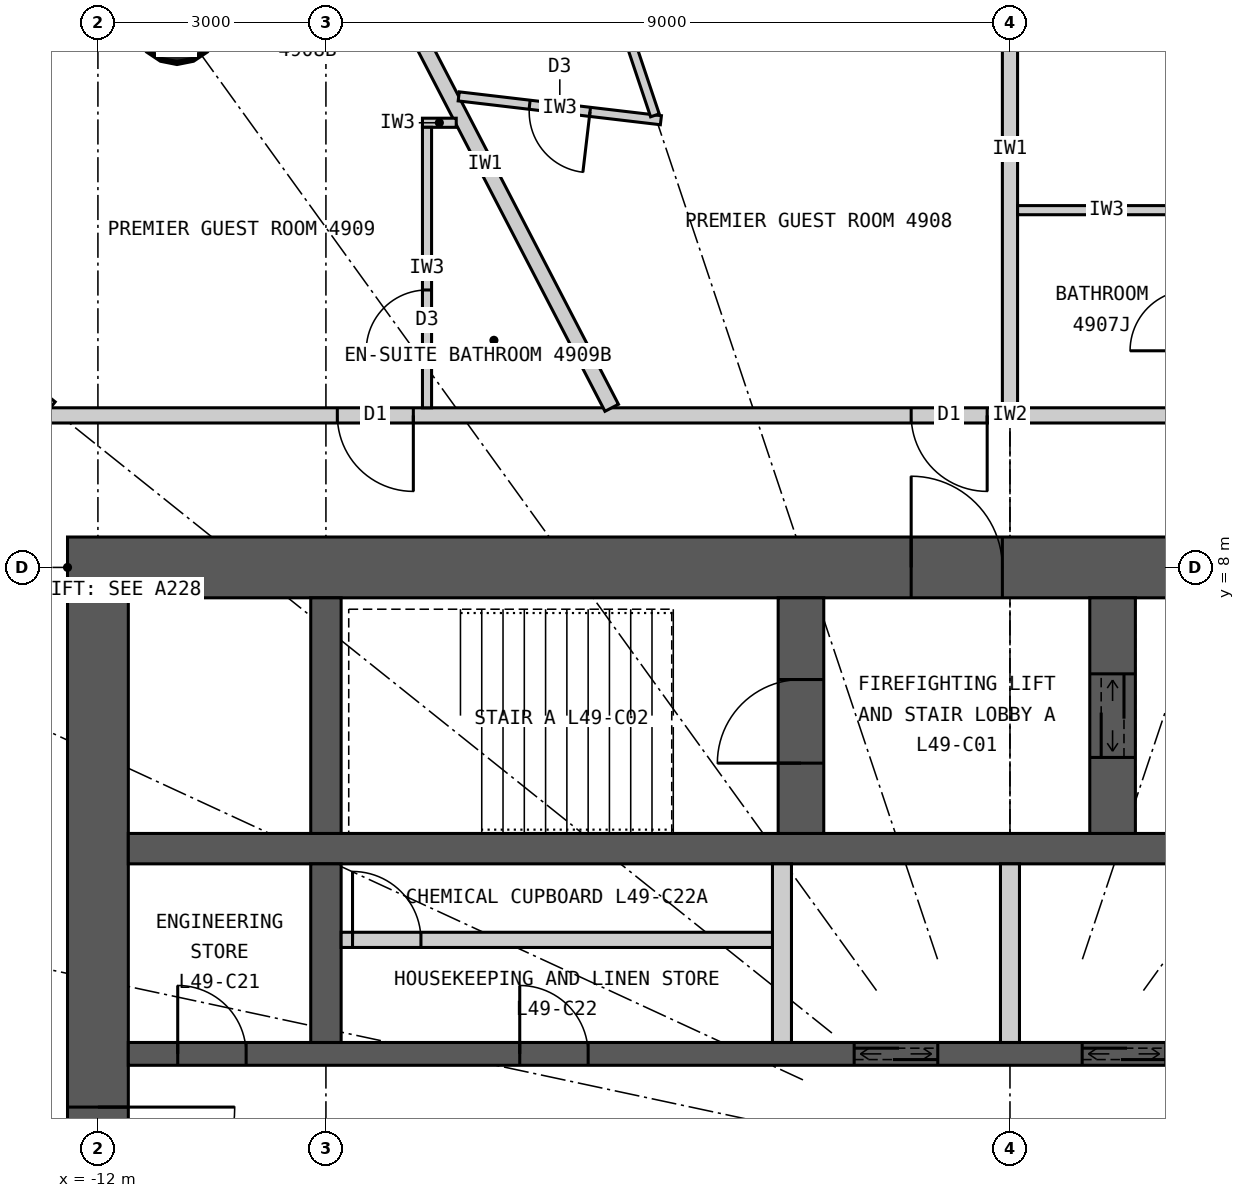
"""IFC4 building model, lengths in metres.
Left out: names, types, materials, properties, quantities, classifications, styles, units other than length and angle.
Written with IfcOpenShell. Run it as: python <this file> out.ifc"""

import sys

from ifc_helpers import new_model, si_unit, direction, frame, frame_2d, origin, origin_2d, place, context, subcontext, project, spatial, rectangle, circle, extrude, clip, halfspace, element, fill, save


model = new_model("IFC4")
c1 = context("Model", 3, precision=1e-05, world=origin(), true_north=direction((0.0, 1.0)))
c2 = subcontext(c1, "Body", "Model", "MODEL_VIEW")
j1 = project(units=[si_unit("LENGTHUNIT", "METRE"), si_unit("PLANEANGLEUNIT", "RADIAN")], contexts=[c1])
p1 = place(None, origin())
s1 = spatial("IfcSite", under=j1, at=p1, CompositionType="ELEMENT")
p2 = place(p1, origin())
s2 = spatial("IfcBuilding", under=s1, at=p2, CompositionType="ELEMENT")
p3 = place(p2, frame((0.0, 0.0, 183.0)))
s3 = spatial("IfcBuildingStorey", under=s2, at=p3, CompositionType="ELEMENT", Elevation=183.0)
p4 = place(p3, frame((-10.96, 15.186, 0.0), z_axis=(0.0, 0.0, 1.0), x_axis=(1.0, 0.0, 0.0)))
e1 = element("IfcColumn", 1, at=p4, inside=s3, PredefinedType="COLUMN", context=c2, shape_type="Clipping", body=[
    clip(extrude(circle(Radius=0.55, at=origin_2d()), origin(), (0.0, 0.0, 1.0), 3.3), halfspace(frame((0.0, 0.0, 2.25), z_axis=(0.0, 0.0, 1.0), x_axis=(1.0, 0.0, 0.0)), False)),
])
p5 = place(p3, frame((-12.4, 8.0, 0.0), z_axis=(0.0, 0.0, 1.0), x_axis=(1.0, 0.0, 0.0)))
e2 = element("IfcWall", 2, at=p5, inside=s3, PredefinedType="SHEAR", context=c2, shape_type="SweptSolid", body=[
    extrude(rectangle(XDim=24.8, YDim=0.8, at=frame_2d((12.4, 0.0))), origin(), (0.0, 0.0, 1.0), 3.3),
])
p6 = place(p5, frame((11.1, 0.0, 0.0)))
e3 = element("IfcOpeningElement", 3, at=p6, cuts=e2, PredefinedType="OPENING", context=c2, shape_type="SweptSolid", body=[
    extrude(rectangle(XDim=1.2, YDim=2.2, at=frame_2d((0.6, 1.1))), frame((0.0, 0.41, 0.0), z_axis=(0.0, -1.0, 0.0), x_axis=(1.0, 0.0, 0.0)), (0.0, 0.0, 1.0), 0.82),
])
p7 = place(p5, frame((18.7, 0.0, 0.0)))
e4 = element("IfcOpeningElement", 4, at=p7, cuts=e2, PredefinedType="OPENING", context=c2, shape_type="SweptSolid", body=[
    extrude(rectangle(XDim=0.9, YDim=2.2, at=frame_2d((0.45, 1.1))), frame((0.0, 0.41, 0.0), z_axis=(0.0, -1.0, 0.0), x_axis=(1.0, 0.0, 0.0)), (0.0, 0.0, 1.0), 0.82),
])
p8 = place(p3, frame((-12.0, 7.6, 0.0), z_axis=(0.0, 0.0, 1.0), x_axis=(0.0, -1.0, 0.0)))
e5 = element("IfcWall", 5, at=p8, inside=s3, PredefinedType="SHEAR", context=c2, shape_type="SweptSolid", body=[
    extrude(rectangle(XDim=15.2, YDim=0.8, at=frame_2d((7.6, 0.0))), origin(), (0.0, 0.0, 1.0), 3.3),
])
p9 = place(p8, frame((6.7, 0.0, 0.0)))
e6 = element("IfcOpeningElement", 6, at=p9, cuts=e5, PredefinedType="OPENING", context=c2, shape_type="SweptSolid", body=[
    extrude(rectangle(XDim=1.8, YDim=2.2, at=frame_2d((0.9, 1.1))), frame((0.0, 0.41, 0.0), z_axis=(0.0, -1.0, 0.0), x_axis=(1.0, 0.0, 0.0)), (0.0, 0.0, 1.0), 0.82),
])
p10 = place(p3, frame((-11.6, 4.3, 0.0), z_axis=(0.0, 0.0, 1.0), x_axis=(1.0, 0.0, 0.0)))
e7 = element("IfcWall", 7, at=p10, inside=s3, PredefinedType="SHEAR", context=c2, shape_type="SweptSolid", body=[
    extrude(rectangle(XDim=23.2, YDim=0.4, at=frame_2d((11.6, 0.0))), origin(), (0.0, 0.0, 1.0), 3.3),
])
p11 = place(p3, frame((-11.6, 1.6, 0.0), z_axis=(0.0, 0.0, 1.0), x_axis=(1.0, 0.0, 0.0)))
e8 = element("IfcWall", 8, at=p11, inside=s3, PredefinedType="SHEAR", context=c2, shape_type="SweptSolid", body=[
    extrude(rectangle(XDim=23.2, YDim=0.3, at=frame_2d((11.6, 0.0))), origin(), (0.0, 0.0, 1.0), 3.3),
])
p12 = place(p11, frame((9.55, 0.0, 0.0)))
e9 = element("IfcOpeningElement", 9, at=p12, cuts=e8, PredefinedType="OPENING", context=c2, shape_type="SweptSolid", body=[
    extrude(rectangle(XDim=1.1, YDim=2.2, at=frame_2d((0.55, 1.1))), frame((0.0, 0.16, 0.0), z_axis=(0.0, -1.0, 0.0), x_axis=(1.0, 0.0, 0.0)), (0.0, 0.0, 1.0), 0.32),
])
p13 = place(p11, frame((12.55, 0.0, 0.0)))
e10 = element("IfcOpeningElement", 10, at=p13, cuts=e8, PredefinedType="OPENING", context=c2, shape_type="SweptSolid", body=[
    extrude(rectangle(XDim=1.1, YDim=2.2, at=frame_2d((0.55, 1.1))), frame((0.0, 0.16, 0.0), z_axis=(0.0, -1.0, 0.0), x_axis=(1.0, 0.0, 0.0)), (0.0, 0.0, 1.0), 0.32),
])
p14 = place(p11, frame((0.65, 0.0, 0.0)))
e11 = element("IfcOpeningElement", 11, at=p14, cuts=e8, PredefinedType="OPENING", context=c2, shape_type="SweptSolid", body=[
    extrude(rectangle(XDim=0.9, YDim=2.2, at=frame_2d((0.45, 1.1))), frame((0.0, 0.16, 0.0), z_axis=(0.0, -1.0, 0.0), x_axis=(1.0, 0.0, 0.0)), (0.0, 0.0, 1.0), 0.32),
])
p15 = place(p11, frame((5.15, 0.0, 0.0)))
e12 = element("IfcOpeningElement", 12, at=p15, cuts=e8, PredefinedType="OPENING", context=c2, shape_type="SweptSolid", body=[
    extrude(rectangle(XDim=0.9, YDim=2.2, at=frame_2d((0.45, 1.1))), frame((0.0, 0.16, 0.0), z_axis=(0.0, -1.0, 0.0), x_axis=(1.0, 0.0, 0.0)), (0.0, 0.0, 1.0), 0.32),
])
p16 = place(p11, frame((21.65, 0.0, 0.0)))
e13 = element("IfcOpeningElement", 13, at=p16, cuts=e8, PredefinedType="OPENING", context=c2, shape_type="SweptSolid", body=[
    extrude(rectangle(XDim=0.9, YDim=2.2, at=frame_2d((0.45, 1.1))), frame((0.0, 0.16, 0.0), z_axis=(0.0, -1.0, 0.0), x_axis=(1.0, 0.0, 0.0)), (0.0, 0.0, 1.0), 0.32),
])
p17 = place(p3, frame((-9.0, 4.5, 0.0), z_axis=(0.0, 0.0, 1.0), x_axis=(0.0, 1.0, 0.0)))
e14 = element("IfcWall", 14, at=p17, inside=s3, PredefinedType="SHEAR", context=c2, shape_type="SweptSolid", body=[
    extrude(rectangle(XDim=3.1, YDim=0.4, at=frame_2d((1.55, 0.0))), origin(), (0.0, 0.0, 1.0), 3.3),
])
p18 = place(p3, frame((-9.0, 1.75, 0.0), z_axis=(0.0, 0.0, 1.0), x_axis=(0.0, 1.0, 0.0)))
e15 = element("IfcWall", 15, at=p18, inside=s3, PredefinedType="SHEAR", context=c2, shape_type="SweptSolid", body=[
    extrude(rectangle(XDim=2.35, YDim=0.4, at=frame_2d((1.175, 0.0))), origin(), (0.0, 0.0, 1.0), 3.3),
])
p19 = place(p3, frame((-2.75, 4.5, 0.0), z_axis=(0.0, 0.0, 1.0), x_axis=(0.0, 1.0, 0.0)))
e16 = element("IfcWall", 16, at=p19, inside=s3, PredefinedType="SHEAR", context=c2, shape_type="SweptSolid", body=[
    extrude(rectangle(XDim=3.1, YDim=0.6, at=frame_2d((1.55, 0.0))), origin(), (0.0, 0.0, 1.0), 3.3),
])
p20 = place(p19, frame((0.925, 0.0, 0.0)))
e17 = element("IfcOpeningElement", 17, at=p20, cuts=e16, PredefinedType="OPENING", context=c2, shape_type="SweptSolid", body=[
    extrude(rectangle(XDim=1.1, YDim=2.2, at=frame_2d((0.55, 1.1))), frame((0.0, 0.31, 0.0), z_axis=(0.0, -1.0, 0.0), x_axis=(1.0, 0.0, 0.0)), (0.0, 0.0, 1.0), 0.62),
])
p21 = place(p3, frame((1.35, 4.5, 0.0), z_axis=(0.0, 0.0, 1.0), x_axis=(0.0, 1.0, 0.0)))
e18 = element("IfcWall", 18, at=p21, inside=s3, PredefinedType="SHEAR", context=c2, shape_type="SweptSolid", body=[
    extrude(rectangle(XDim=3.1, YDim=0.6, at=frame_2d((1.55, 0.0))), origin(), (0.0, 0.0, 1.0), 3.3),
])
p22 = place(p21, frame((1.0, 0.0, 0.0)))
e19 = element("IfcOpeningElement", 19, at=p22, cuts=e18, PredefinedType="OPENING", context=c2, shape_type="SweptSolid", body=[
    extrude(rectangle(XDim=1.1, YDim=2.2, at=frame_2d((0.55, 1.1))), frame((0.0, 0.31, 0.0), z_axis=(0.0, -1.0, 0.0), x_axis=(1.0, 0.0, 0.0)), (0.0, 0.0, 1.0), 0.62),
])
for number, where, z_axis, x_axis in (
    (20, (-3.0, 1.75, 0.0), (0.0, 0.0, 1.0), (0.0, 1.0, 0.0)),
    (21, (0.0, 1.75, 0.0), (0.0, 0.0, 1.0), (0.0, 1.0, 0.0)),
):
    element("IfcWall", number, at=place(p3, frame(where, z_axis=z_axis, x_axis=x_axis)), inside=s3, PredefinedType="PARTITIONING", context=c2, shape_type="SweptSolid", body=[
        extrude(rectangle(XDim=2.35, YDim=0.25, at=frame_2d((1.175, 0.0))), origin(), (0.0, 0.0, 1.0), 3.3),
    ])
p23 = place(p3, frame((-11.346, 15.722, 0.0), z_axis=(0.0, 0.0, 1.0), x_axis=(-0.857695199231, -0.514158482587, 0.0)))
e22 = element("IfcWall", 22, at=p23, inside=s3, PredefinedType="ELEMENTEDWALL", context=c2, shape_type="SweptSolid", body=[
    extrude(rectangle(XDim=5.536, YDim=0.15, at=frame_2d((2.768, 0.0))), origin(), (0.0, 0.0, 1.0), 3.05),
])
p24 = place(p23, frame((1.068, 0.0, 0.9)))
e23 = element("IfcOpeningElement", 23, at=p24, cuts=e22, PredefinedType="OPENING", context=c2, shape_type="SweptSolid", body=[
    extrude(rectangle(XDim=1.4, YDim=1.9, at=frame_2d((0.7, 0.95))), frame((0.0, 0.085, 0.0), z_axis=(0.0, -1.0, 0.0), x_axis=(1.0, 0.0, 0.0)), (0.0, 0.0, 1.0), 0.17),
])
p25 = place(p23, frame((3.068, 0.0, 0.9)))
e24 = element("IfcOpeningElement", 24, at=p25, cuts=e22, PredefinedType="OPENING", context=c2, shape_type="SweptSolid", body=[
    extrude(rectangle(XDim=1.4, YDim=1.9, at=frame_2d((0.7, 0.95))), frame((0.0, 0.085, 0.0), z_axis=(0.0, -1.0, 0.0), x_axis=(1.0, 0.0, 0.0)), (0.0, 0.0, 1.0), 0.17),
])
p26 = place(p3, frame((-14.1, 10.0, 0.0), z_axis=(0.0, 0.0, 1.0), x_axis=(1.0, 0.0, 0.0)))
e25 = element("IfcWall", 25, at=p26, inside=s3, PredefinedType="PARTITIONING", context=c2, shape_type="SweptSolid", body=[
    extrude(rectangle(XDim=28.2, YDim=0.2, at=frame_2d((14.1, 0.0))), origin(), (0.0, 0.0, 1.0), 3.05),
])
p27 = place(p26, frame((24.549, 0.0, 0.0)))
e26 = element("IfcOpeningElement", 26, at=p27, cuts=e25, PredefinedType="OPENING", context=c2, shape_type="SweptSolid", body=[
    extrude(rectangle(XDim=1.0, YDim=2.2, at=frame_2d((0.5, 1.1))), frame((0.0, 0.11, 0.0), z_axis=(0.0, -1.0, 0.0), x_axis=(1.0, 0.0, 0.0)), (0.0, 0.0, 1.0), 0.22),
])
p28 = place(p26, frame((18.829, 0.0, 0.0)))
e27 = element("IfcOpeningElement", 27, at=p28, cuts=e25, PredefinedType="OPENING", context=c2, shape_type="SweptSolid", body=[
    extrude(rectangle(XDim=1.0, YDim=2.2, at=frame_2d((0.5, 1.1))), frame((0.0, 0.11, 0.0), z_axis=(0.0, -1.0, 0.0), x_axis=(1.0, 0.0, 0.0)), (0.0, 0.0, 1.0), 0.22),
])
p29 = place(p26, frame((12.8, 0.0, 0.0)))
e28 = element("IfcOpeningElement", 28, at=p29, cuts=e25, PredefinedType="OPENING", context=c2, shape_type="SweptSolid", body=[
    extrude(rectangle(XDim=1.0, YDim=2.2, at=frame_2d((0.5, 1.1))), frame((0.0, 0.11, 0.0), z_axis=(0.0, -1.0, 0.0), x_axis=(1.0, 0.0, 0.0)), (0.0, 0.0, 1.0), 0.22),
])
p30 = place(p26, frame((5.25, 0.0, 0.0)))
e29 = element("IfcOpeningElement", 29, at=p30, cuts=e25, PredefinedType="OPENING", context=c2, shape_type="SweptSolid", body=[
    extrude(rectangle(XDim=1.0, YDim=2.2, at=frame_2d((0.5, 1.1))), frame((0.0, 0.11, 0.0), z_axis=(0.0, -1.0, 0.0), x_axis=(1.0, 0.0, 0.0)), (0.0, 0.0, 1.0), 0.22),
])
p31 = place(p3, frame((0.0, 10.1, 0.0), z_axis=(0.0, 0.0, 1.0), x_axis=(0.0, 1.0, 0.0)))
e30 = element("IfcWall", 30, at=p31, inside=s3, PredefinedType="PARTITIONING", context=c2, shape_type="SweptSolid", body=[
    extrude(rectangle(XDim=6.8, YDim=0.2, at=frame_2d((3.4, 0.0))), origin(), (0.0, 0.0, 1.0), 2.25),
])
p32 = place(p3, frame((-5.24, 10.1, 0.0), z_axis=(0.0, 0.0, 1.0), x_axis=(-0.460532965373, 0.887642601391, 0.0)))
e31 = element("IfcWall", 31, at=p32, inside=s3, PredefinedType="PARTITIONING", context=c2, shape_type="SweptSolid", body=[
    extrude(rectangle(XDim=7.231, YDim=0.2, at=frame_2d((3.616, 0.0))), origin(), (0.0, 0.0, 1.0), 3.05),
])
p33 = place(p3, frame((-12.625, 10.1, 0.0), z_axis=(0.0, 0.0, 1.0), x_axis=(-0.780876185034, 0.624685827954, 0.0)))
e32 = element("IfcWall", 32, at=p33, inside=s3, PredefinedType="PARTITIONING", context=c2, shape_type="SweptSolid", body=[
    extrude(rectangle(XDim=3.229, YDim=0.2, at=frame_2d((1.615, 0.0))), origin(), (0.0, 0.0, 1.0), 2.25),
])
p34 = place(p3, frame((0.1, 12.7, 0.0), z_axis=(0.0, 0.0, 1.0), x_axis=(1.0, 0.0, 0.0)))
e33 = element("IfcWall", 33, at=p34, inside=s3, PredefinedType="PARTITIONING", context=c2, shape_type="SweptSolid", body=[
    extrude(rectangle(XDim=2.34, YDim=0.12, at=frame_2d((1.17, 0.0))), origin(), (0.0, 0.0, 1.0), 3.05),
])
p35 = place(p3, frame((-7.253, 14.197, 0.0), z_axis=(0.0, 0.0, 1.0), x_axis=(0.993128188393, -0.117031625725, 0.0)))
e34 = element("IfcWall", 34, at=p35, inside=s3, PredefinedType="PARTITIONING", context=c2, shape_type="SweptSolid", body=[
    extrude(rectangle(XDim=2.678, YDim=0.12, at=frame_2d((1.339, 0.0))), origin(), (0.0, 0.0, 1.0), 3.05),
])
p36 = place(p35, frame((0.939, 0.0, 0.0)))
e35 = element("IfcOpeningElement", 35, at=p36, cuts=e34, PredefinedType="OPENING", context=c2, shape_type="SweptSolid", body=[
    extrude(rectangle(XDim=0.8, YDim=2.1, at=frame_2d((0.4, 1.05))), frame((0.0, 0.07, 0.0), z_axis=(0.0, -1.0, 0.0), x_axis=(1.0, 0.0, 0.0)), (0.0, 0.0, 1.0), 0.14),
])
p37 = place(p3, frame((-4.671, 13.948, 0.0), z_axis=(0.0, 0.0, 1.0), x_axis=(-0.317669167093, 0.948201613729, 0.0)))
e36 = element("IfcWall", 36, at=p37, inside=s3, PredefinedType="PARTITIONING", context=c2, shape_type="SweptSolid", body=[
    extrude(rectangle(XDim=2.54, YDim=0.12, at=frame_2d((1.27, 0.0))), origin(), (0.0, 0.0, 1.0), 2.15),
])
p38 = place(p3, frame((-7.286, 13.85, 0.0), z_axis=(0.0, 0.0, 1.0), x_axis=(-1.0, 0.0, 0.0)))
e37 = element("IfcWall", 37, at=p38, inside=s3, PredefinedType="PARTITIONING", context=c2, shape_type="SweptSolid", body=[
    extrude(rectangle(XDim=0.444, YDim=0.12, at=frame_2d((0.222, 0.0))), origin(), (0.0, 0.0, 1.0), 3.05),
])
p39 = place(p3, frame((-7.67, 10.1, 0.0), z_axis=(0.0, 0.0, 1.0), x_axis=(0.0, 1.0, 0.0)))
e38 = element("IfcWall", 38, at=p39, inside=s3, PredefinedType="PARTITIONING", context=c2, shape_type="SweptSolid", body=[
    extrude(rectangle(XDim=3.69, YDim=0.12, at=frame_2d((1.845, 0.0))), origin(), (0.0, 0.0, 1.0), 3.05),
])
p40 = place(p39, frame((0.75, 0.0, 0.0)))
e39 = element("IfcOpeningElement", 39, at=p40, cuts=e38, PredefinedType="OPENING", context=c2, shape_type="SweptSolid", body=[
    extrude(rectangle(XDim=0.8, YDim=2.1, at=frame_2d((0.4, 1.05))), frame((0.0, 0.07, 0.0), z_axis=(0.0, -1.0, 0.0), x_axis=(1.0, 0.0, 0.0)), (0.0, 0.0, 1.0), 0.14),
])
p41 = place(p3, frame((-8.8, 3.1, 0.0), z_axis=(0.0, 0.0, 1.0), x_axis=(1.0, 0.0, 0.0)))
e40 = element("IfcWall", 40, at=p41, inside=s3, PredefinedType="PARTITIONING", context=c2, shape_type="SweptSolid", body=[
    extrude(rectangle(XDim=5.675, YDim=0.2, at=frame_2d((2.837, 0.0))), origin(), (0.0, 0.0, 1.0), 3.05),
])
p42 = place(p41, frame((0.15, 0.0, 0.0)))
e41 = element("IfcOpeningElement", 41, at=p42, cuts=e40, PredefinedType="OPENING", context=c2, shape_type="SweptSolid", body=[
    extrude(rectangle(XDim=0.9, YDim=2.2, at=frame_2d((0.45, 1.1))), frame((0.0, 0.11, 0.0), z_axis=(0.0, -1.0, 0.0), x_axis=(1.0, 0.0, 0.0)), (0.0, 0.0, 1.0), 0.22),
])
p43 = place(p24, origin())
e42 = element("IfcWindow", 42, at=p43, inside=s3, PartitioningType="SINGLE_PANEL", PredefinedType="WINDOW", context=c2, shape_type="SweptSolid", body=[
    extrude(rectangle(XDim=1.4, YDim=1.9, at=frame_2d((0.7, 0.95))), frame((0.0, 0.03, 0.0), z_axis=(0.0, -1.0, 0.0), x_axis=(1.0, 0.0, 0.0)), (0.0, 0.0, 1.0), 0.06),
])
fill(e23, e42)
p44 = place(p36, origin())
e43 = element("IfcDoor", 43, at=p44, inside=s3, OperationType="SINGLE_SWING_RIGHT", PredefinedType="DOOR", context=c2, shape_type="SweptSolid", body=[
    extrude(rectangle(XDim=0.8, YDim=2.1, at=frame_2d((0.4, 1.05))), frame((0.0, 0.025, 0.0), z_axis=(0.0, -1.0, 0.0), x_axis=(1.0, 0.0, 0.0)), (0.0, 0.0, 1.0), 0.05),
])
fill(e35, e43)
p45 = place(p29, origin())
e44 = element("IfcDoor", 44, at=p45, inside=s3, OperationType="SINGLE_SWING_RIGHT", PredefinedType="DOOR", context=c2, shape_type="SweptSolid", body=[
    extrude(rectangle(XDim=1.0, YDim=2.2, at=frame_2d((0.5, 1.1))), frame((0.0, 0.025, 0.0), z_axis=(0.0, -1.0, 0.0), x_axis=(1.0, 0.0, 0.0)), (0.0, 0.0, 1.0), 0.05),
])
fill(e28, e44)
p46 = place(p40, origin())
e45 = element("IfcDoor", 45, at=p46, inside=s3, OperationType="SINGLE_SWING_LEFT", PredefinedType="DOOR", context=c2, shape_type="SweptSolid", body=[
    extrude(rectangle(XDim=0.8, YDim=2.1, at=frame_2d((0.4, 1.05))), frame((0.0, 0.025, 0.0), z_axis=(0.0, -1.0, 0.0), x_axis=(1.0, 0.0, 0.0)), (0.0, 0.0, 1.0), 0.05),
])
fill(e39, e45)
p47 = place(p30, origin())
e46 = element("IfcDoor", 46, at=p47, inside=s3, OperationType="SINGLE_SWING_RIGHT", PredefinedType="DOOR", context=c2, shape_type="SweptSolid", body=[
    extrude(rectangle(XDim=1.0, YDim=2.2, at=frame_2d((0.5, 1.1))), frame((0.0, 0.025, 0.0), z_axis=(0.0, -1.0, 0.0), x_axis=(1.0, 0.0, 0.0)), (0.0, 0.0, 1.0), 0.05),
])
fill(e29, e46)
p48 = place(p6, origin())
e47 = element("IfcDoor", 47, at=p48, inside=s3, OperationType="SINGLE_SWING_LEFT", PredefinedType="DOOR", context=c2, shape_type="SweptSolid", body=[
    extrude(rectangle(XDim=1.2, YDim=2.2, at=frame_2d((0.6, 1.1))), frame((0.0, 0.025, 0.0), z_axis=(0.0, -1.0, 0.0), x_axis=(1.0, 0.0, 0.0)), (0.0, 0.0, 1.0), 0.05),
])
fill(e3, e47)
p49 = place(p20, origin())
e48 = element("IfcDoor", 48, at=p49, inside=s3, OperationType="SINGLE_SWING_LEFT", PredefinedType="DOOR", context=c2, shape_type="SweptSolid", body=[
    extrude(rectangle(XDim=1.1, YDim=2.2, at=frame_2d((0.55, 1.1))), frame((0.0, 0.025, 0.0), z_axis=(0.0, -1.0, 0.0), x_axis=(1.0, 0.0, 0.0)), (0.0, 0.0, 1.0), 0.05),
])
fill(e17, e48)
p50 = place(p22, origin())
e49 = element("IfcDoor", 49, at=p50, inside=s3, OperationType="DOUBLE_DOOR_SLIDING", PredefinedType="DOOR", context=c2, shape_type="SweptSolid", body=[
    extrude(rectangle(XDim=1.1, YDim=2.2, at=frame_2d((0.55, 1.1))), frame((0.0, 0.025, 0.0), z_axis=(0.0, -1.0, 0.0), x_axis=(1.0, 0.0, 0.0)), (0.0, 0.0, 1.0), 0.05),
])
fill(e19, e49)
p51 = place(p12, origin())
e50 = element("IfcDoor", 50, at=p51, inside=s3, OperationType="DOUBLE_DOOR_SLIDING", PredefinedType="DOOR", context=c2, shape_type="SweptSolid", body=[
    extrude(rectangle(XDim=1.1, YDim=2.2, at=frame_2d((0.55, 1.1))), frame((0.0, 0.025, 0.0), z_axis=(0.0, -1.0, 0.0), x_axis=(1.0, 0.0, 0.0)), (0.0, 0.0, 1.0), 0.05),
])
fill(e9, e50)
p52 = place(p13, origin())
e51 = element("IfcDoor", 51, at=p52, inside=s3, OperationType="DOUBLE_DOOR_SLIDING", PredefinedType="DOOR", context=c2, shape_type="SweptSolid", body=[
    extrude(rectangle(XDim=1.1, YDim=2.2, at=frame_2d((0.55, 1.1))), frame((0.0, 0.025, 0.0), z_axis=(0.0, -1.0, 0.0), x_axis=(1.0, 0.0, 0.0)), (0.0, 0.0, 1.0), 0.05),
])
fill(e10, e51)
p53 = place(p14, origin())
e52 = element("IfcDoor", 52, at=p53, inside=s3, OperationType="SINGLE_SWING_LEFT", PredefinedType="DOOR", context=c2, shape_type="SweptSolid", body=[
    extrude(rectangle(XDim=0.9, YDim=2.2, at=frame_2d((0.45, 1.1))), frame((0.0, 0.025, 0.0), z_axis=(0.0, -1.0, 0.0), x_axis=(1.0, 0.0, 0.0)), (0.0, 0.0, 1.0), 0.05),
])
fill(e11, e52)
p54 = place(p42, origin())
e53 = element("IfcDoor", 53, at=p54, inside=s3, OperationType="SINGLE_SWING_LEFT", PredefinedType="DOOR", context=c2, shape_type="SweptSolid", body=[
    extrude(rectangle(XDim=0.9, YDim=2.2, at=frame_2d((0.45, 1.1))), frame((0.0, 0.025, 0.0), z_axis=(0.0, -1.0, 0.0), x_axis=(1.0, 0.0, 0.0)), (0.0, 0.0, 1.0), 0.05),
])
fill(e41, e53)
p55 = place(p15, origin())
e54 = element("IfcDoor", 54, at=p55, inside=s3, OperationType="SINGLE_SWING_LEFT", PredefinedType="DOOR", context=c2, shape_type="SweptSolid", body=[
    extrude(rectangle(XDim=0.9, YDim=2.2, at=frame_2d((0.45, 1.1))), frame((0.0, 0.025, 0.0), z_axis=(0.0, -1.0, 0.0), x_axis=(1.0, 0.0, 0.0)), (0.0, 0.0, 1.0), 0.05),
])
fill(e12, e54)
p56 = place(p9, origin())
e55 = element("IfcDoor", 55, at=p56, inside=s3, OperationType="DOUBLE_DOOR_DOUBLE_SWING", PredefinedType="DOOR", context=c2, shape_type="SweptSolid", body=[
    extrude(rectangle(XDim=1.8, YDim=2.2, at=frame_2d((0.9, 1.1))), frame((0.0, 0.025, 0.0), z_axis=(0.0, -1.0, 0.0), x_axis=(1.0, 0.0, 0.0)), (0.0, 0.0, 1.0), 0.05),
])
fill(e6, e55)
save(model, sys.argv[1])
